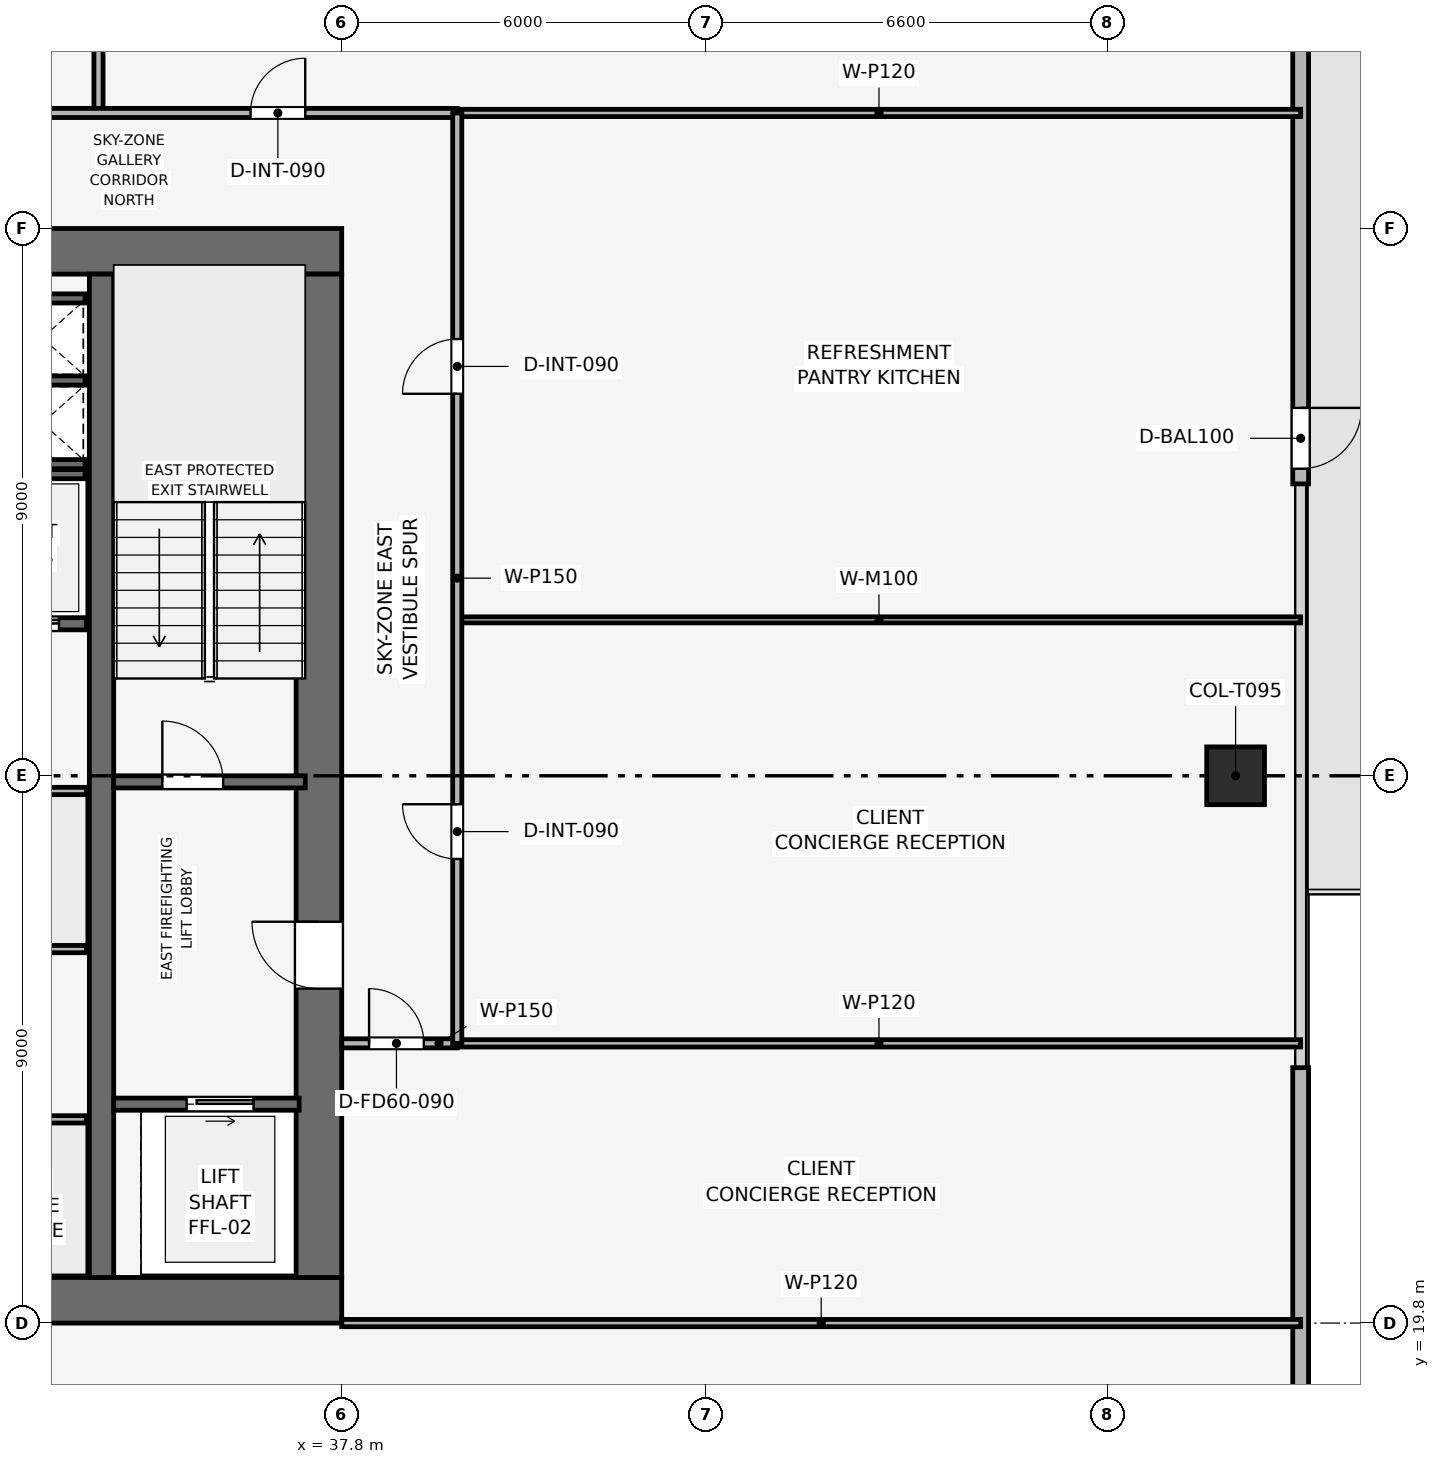
"""IFC4 building model, lengths in metres.
Left out: names, types, materials, properties, quantities, classifications, styles, units other than length and angle.
Written with IfcOpenShell. Run it as: python <this file> out.ifc"""

import sys

from ifc_helpers import new_model, si_unit, direction, frame, frame_2d, origin, origin_2d, place, context, subcontext, project, spatial, rectangle, extrude, element, fill, save


model = new_model("IFC4")
c1 = context("Model", 3, precision=1e-05, world=origin(), true_north=direction((0.0, 1.0)))
c2 = subcontext(c1, "Body", "Model", "MODEL_VIEW")
j1 = project(units=[si_unit("LENGTHUNIT", "METRE"), si_unit("PLANEANGLEUNIT", "RADIAN")], contexts=[c1])
p1 = place(None, origin())
s1 = spatial("IfcSite", under=j1, at=p1, CompositionType="ELEMENT")
p2 = place(p1, origin())
s2 = spatial("IfcBuilding", under=s1, at=p2, CompositionType="ELEMENT")
p3 = place(p2, frame((0.0, 0.0, 272.85)))
s3 = spatial("IfcBuildingStorey", under=s2, at=p3, CompositionType="ELEMENT", Elevation=272.85)
p4 = place(p3, frame((19.8, 20.175, 0.0), z_axis=(0.0, 0.0, 1.0), x_axis=(1.0, 0.0, 0.0)))
e1 = element("IfcWall", 1, at=p4, inside=s3, PredefinedType="SHEAR", context=c2, shape_type="SweptSolid", body=[
    extrude(rectangle(XDim=18.0, YDim=0.75, at=frame_2d((9.0, 0.0))), origin(), (0.0, 0.0, 1.0), 3.75),
])
p5 = place(p3, frame((19.8, 37.425, 0.0), z_axis=(0.0, 0.0, 1.0), x_axis=(1.0, 0.0, 0.0)))
e2 = element("IfcWall", 2, at=p5, inside=s3, PredefinedType="SHEAR", context=c2, shape_type="SweptSolid", body=[
    extrude(rectangle(XDim=18.0, YDim=0.75, at=frame_2d((9.0, 0.0))), origin(), (0.0, 0.0, 1.0), 3.75),
])
p6 = place(p5, frame((7.05, 0.0, 0.0)))
e3 = element("IfcOpeningElement", 3, at=p6, cuts=e2, PredefinedType="OPENING", context=c2, shape_type="SweptSolid", body=[
    extrude(rectangle(XDim=1.1, YDim=2.15, at=frame_2d((0.55, 1.075))), frame((0.0, 0.385, 0.0), z_axis=(0.0, -1.0, 0.0), x_axis=(1.0, 0.0, 0.0)), (0.0, 0.0, 1.0), 0.77),
])
p7 = place(p3, frame((37.425, 20.55, 0.0), z_axis=(0.0, 0.0, 1.0), x_axis=(0.0, 1.0, 0.0)))
e4 = element("IfcWall", 4, at=p7, inside=s3, PredefinedType="SHEAR", context=c2, shape_type="SweptSolid", body=[
    extrude(rectangle(XDim=16.5, YDim=0.75, at=frame_2d((8.25, 0.0))), origin(), (0.0, 0.0, 1.0), 3.75),
])
p8 = place(p7, frame((4.75, 0.0, 0.0)))
e5 = element("IfcOpeningElement", 5, at=p8, cuts=e4, PredefinedType="OPENING", context=c2, shape_type="SweptSolid", body=[
    extrude(rectangle(XDim=1.1, YDim=2.15, at=frame_2d((0.55, 1.075))), frame((0.0, 0.385, 0.0), z_axis=(0.0, -1.0, 0.0), x_axis=(1.0, 0.0, 0.0)), (0.0, 0.0, 1.0), 0.77),
])
p9 = place(p3, frame((33.85, 20.55, 0.0), z_axis=(0.0, 0.0, 1.0), x_axis=(0.0, 1.0, 0.0)))
e6 = element("IfcWall", 6, at=p9, inside=s3, PredefinedType="SHEAR", context=c2, shape_type="SweptSolid", body=[
    extrude(rectangle(XDim=16.5, YDim=0.4, at=frame_2d((8.25, 0.0))), origin(), (0.0, 0.0, 1.0), 3.75),
])
p10 = place(p3, frame((52.5, 28.8, 0.003), z_axis=(0.0, 0.0, 1.0), x_axis=(1.0, 0.0, 0.0)))
e7 = element("IfcColumn", 7, at=p10, inside=s3, PredefinedType="COLUMN", context=c2, shape_type="SweptSolid", body=[
    extrude(rectangle(XDim=0.95, YDim=0.95, at=origin_2d()), origin(), (0.0, 0.0, 1.0), 3.494),
])
p11 = place(p3, frame((53.57, 46.8, 0.0), z_axis=(0.0, 0.0, 1.0), x_axis=(0.0, -1.0, 0.0)))
e8 = element("IfcWall", 8, at=p11, inside=s3, PredefinedType="SOLIDWALL", context=c2, shape_type="SweptSolid", body=[
    extrude(rectangle(XDim=13.2, YDim=0.26, at=frame_2d((6.6, 0.0))), origin(), (0.0, 0.0, 1.0), 3.5),
])
p12 = place(p11, frame((11.95, 0.0, 0.0)))
e9 = element("IfcOpeningElement", 9, at=p12, cuts=e8, PredefinedType="OPENING", context=c2, shape_type="SweptSolid", body=[
    extrude(rectangle(XDim=1.0, YDim=2.2, at=frame_2d((0.5, 1.1))), frame((0.0, 0.14, 0.0), z_axis=(0.0, -1.0, 0.0), x_axis=(1.0, 0.0, 0.0)), (0.0, 0.0, 1.0), 0.28),
])
p13 = place(p3, frame((53.57, 24.0, 0.0), z_axis=(0.0, 0.0, 1.0), x_axis=(0.0, -1.0, 0.0)))
e10 = element("IfcWall", 10, at=p13, inside=s3, PredefinedType="SOLIDWALL", context=c2, shape_type="SweptSolid", body=[
    extrude(rectangle(XDim=13.2, YDim=0.26, at=frame_2d((6.6, 0.0))), origin(), (0.0, 0.0, 1.0), 3.5),
])
p14 = place(p13, frame((11.75, 0.0, 0.9)))
e11 = element("IfcOpeningElement", 11, at=p14, cuts=e10, PredefinedType="OPENING", context=c2, shape_type="SweptSolid", body=[
    extrude(rectangle(XDim=1.2, YDim=2.1, at=frame_2d((0.6, 1.05))), frame((0.0, 0.14, 0.0), z_axis=(0.0, -1.0, 0.0), x_axis=(1.0, 0.0, 0.0)), (0.0, 0.0, 1.0), 0.28),
])
p15 = place(p3, frame((34.05, 28.7, 0.0), z_axis=(0.0, 0.0, 1.0), x_axis=(1.0, 0.0, 0.0)))
e12 = element("IfcWall", 12, at=p15, inside=s3, PredefinedType="SHEAR", context=c2, shape_type="SweptSolid", body=[
    extrude(rectangle(XDim=3.15, YDim=0.2, at=frame_2d((1.575, 0.0))), origin(), (0.0, 0.0, 1.0), 3.5),
])
p16 = place(p15, frame((0.8, 0.0, 0.0)))
e13 = element("IfcOpeningElement", 13, at=p16, cuts=e12, PredefinedType="OPENING", context=c2, shape_type="SweptSolid", body=[
    extrude(rectangle(XDim=1.0, YDim=2.1, at=frame_2d((0.5, 1.05))), frame((0.0, 0.11, 0.0), z_axis=(0.0, -1.0, 0.0), x_axis=(1.0, 0.0, 0.0)), (0.0, 0.0, 1.0), 0.22),
])
for number, where, z_axis, x_axis in (
    (14, (32.25, 33.925, 0.0), (0.0, 0.0, 1.0), (1.0, 0.0, 0.0)),
    (15, (32.25, 35.3, 0.0), (0.0, 0.0, 1.0), (1.0, 0.0, 0.0)),
):
    element("IfcWall", number, at=place(p3, frame(where, z_axis=z_axis, x_axis=x_axis)), inside=s3, PredefinedType="SHEAR", context=c2, shape_type="SweptSolid", body=[
        extrude(rectangle(XDim=1.33, YDim=0.15, at=frame_2d((0.665, 0.0))), origin(), (0.0, 0.0, 1.0), 3.5),
    ])
p17 = place(p3, frame((34.05, 23.4, 0.0), z_axis=(0.0, 0.0, 1.0), x_axis=(1.0, 0.0, 0.0)))
e16 = element("IfcWall", 16, at=p17, inside=s3, PredefinedType="SHEAR", context=c2, shape_type="SweptSolid", body=[
    extrude(rectangle(XDim=3.05, YDim=0.2, at=frame_2d((1.525, 0.0))), origin(), (0.0, 0.0, 1.0), 3.5),
])
p18 = place(p17, frame((1.2, 0.0, 0.0)))
e17 = element("IfcOpeningElement", 17, at=p18, cuts=e16, PredefinedType="OPENING", context=c2, shape_type="SweptSolid", body=[
    extrude(rectangle(XDim=1.1, YDim=2.15, at=frame_2d((0.55, 1.075))), frame((0.0, 0.11, 0.0), z_axis=(0.0, -1.0, 0.0), x_axis=(1.0, 0.0, 0.0)), (0.0, 0.0, 1.0), 0.22),
])
p19 = place(p3, frame((31.6, 31.3, 0.0), z_axis=(0.0, 0.0, 1.0), x_axis=(1.0, 0.0, 0.0)))
e18 = element("IfcWall", 18, at=p19, inside=s3, PredefinedType="SHEAR", context=c2, shape_type="SweptSolid", body=[
    extrude(rectangle(XDim=2.0, YDim=0.2, at=frame_2d((1.0, 0.0))), origin(), (0.0, 0.0, 1.0), 3.5),
])
p20 = place(p19, frame((0.45, 0.0, 0.0)))
e19 = element("IfcOpeningElement", 19, at=p20, cuts=e18, PredefinedType="OPENING", context=c2, shape_type="SweptSolid", body=[
    extrude(rectangle(XDim=1.1, YDim=2.15, at=frame_2d((0.55, 1.075))), frame((0.0, 0.11, 0.0), z_axis=(0.0, -1.0, 0.0), x_axis=(1.0, 0.0, 0.0)), (0.0, 0.0, 1.0), 0.22),
])
p21 = place(p3, frame((32.25, 36.65, 0.0), z_axis=(0.0, 0.0, 1.0), x_axis=(1.0, 0.0, 0.0)))
e20 = element("IfcWall", 20, at=p21, inside=s3, PredefinedType="SHEAR", context=c2, shape_type="SweptSolid", body=[
    extrude(rectangle(XDim=1.33, YDim=0.15, at=frame_2d((0.665, 0.0))), origin(), (0.0, 0.0, 1.0), 3.5),
])
p22 = place(p3, frame((29.5, 33.76, 0.0), z_axis=(0.0, 0.0, 1.0), x_axis=(1.0, 0.0, 0.0)))
e21 = element("IfcWall", 21, at=p22, inside=s3, PredefinedType="SHEAR", context=c2, shape_type="SweptSolid", body=[
    extrude(rectangle(XDim=4.08, YDim=0.15, at=frame_2d((2.04, 0.0))), origin(), (0.0, 0.0, 1.0), 3.5),
])
p23 = place(p3, frame((29.55, 23.15, 0.0), z_axis=(0.0, 0.0, 1.0), x_axis=(1.0, 0.0, 0.0)))
e22 = element("IfcWall", 22, at=p23, inside=s3, PredefinedType="PARTITIONING", context=c2, shape_type="SweptSolid", body=[
    extrude(rectangle(XDim=4.05, YDim=0.12, at=frame_2d((2.025, 0.0))), origin(), (0.0, 0.0, 1.0), 3.5),
])
p24 = place(p23, frame((1.575, 0.0, 0.0)))
e23 = element("IfcOpeningElement", 23, at=p24, cuts=e22, PredefinedType="OPENING", context=c2, shape_type="SweptSolid", body=[
    extrude(rectangle(XDim=0.9, YDim=2.1, at=frame_2d((0.45, 1.05))), frame((0.0, 0.07, 0.0), z_axis=(0.0, -1.0, 0.0), x_axis=(1.0, 0.0, 0.0)), (0.0, 0.0, 1.0), 0.14),
])
p25 = place(p3, frame((29.55, 25.95, 0.0), z_axis=(0.0, 0.0, 1.0), x_axis=(1.0, 0.0, 0.0)))
e24 = element("IfcWall", 24, at=p25, inside=s3, PredefinedType="PARTITIONING", context=c2, shape_type="SweptSolid", body=[
    extrude(rectangle(XDim=4.05, YDim=0.12, at=frame_2d((2.025, 0.0))), origin(), (0.0, 0.0, 1.0), 3.5),
])
p26 = place(p25, frame((1.575, 0.0, 0.0)))
e25 = element("IfcOpeningElement", 25, at=p26, cuts=e24, PredefinedType="OPENING", context=c2, shape_type="SweptSolid", body=[
    extrude(rectangle(XDim=0.9, YDim=2.1, at=frame_2d((0.45, 1.05))), frame((0.0, 0.07, 0.0), z_axis=(0.0, -1.0, 0.0), x_axis=(1.0, 0.0, 0.0)), (0.0, 0.0, 1.0), 0.14),
])
p27 = place(p3, frame((29.55, 28.55, 0.0), z_axis=(0.0, 0.0, 1.0), x_axis=(1.0, 0.0, 0.0)))
e26 = element("IfcWall", 26, at=p27, inside=s3, PredefinedType="PARTITIONING", context=c2, shape_type="SweptSolid", body=[
    extrude(rectangle(XDim=4.05, YDim=0.12, at=frame_2d((2.025, 0.0))), origin(), (0.0, 0.0, 1.0), 3.5),
])
p28 = place(p3, frame((33.8, 39.7, 0.0), z_axis=(0.0, 0.0, 1.0), x_axis=(0.0, 1.0, 0.0)))
e27 = element("IfcWall", 27, at=p28, inside=s3, PredefinedType="PARTITIONING", context=c2, shape_type="SweptSolid", body=[
    extrude(rectangle(XDim=13.87, YDim=0.15, at=frame_2d((6.935, 0.0))), origin(), (0.0, 0.0, 1.0), 3.085),
])
p29 = place(p3, frame((37.8, 19.8, 0.0), z_axis=(0.0, 0.0, 1.0), x_axis=(1.0, 0.0, 0.0)))
e28 = element("IfcWall", 28, at=p29, inside=s3, PredefinedType="PARTITIONING", context=c2, shape_type="SweptSolid", body=[
    extrude(rectangle(XDim=15.77, YDim=0.12, at=frame_2d((7.885, 0.0))), origin(), (0.0, 0.0, 1.0), 3.085),
])
p30 = place(p3, frame((37.8, 24.4, 0.0), z_axis=(0.0, 0.0, 1.0), x_axis=(1.0, 0.0, 0.0)))
e29 = element("IfcWall", 29, at=p30, inside=s3, PredefinedType="PARTITIONING", context=c2, shape_type="SweptSolid", body=[
    extrude(rectangle(XDim=1.9, YDim=0.15, at=frame_2d((0.95, 0.0))), origin(), (0.0, 0.0, 1.0), 3.5),
])
p31 = place(p30, frame((0.45, 0.0, 0.0)))
e30 = element("IfcOpeningElement", 30, at=p31, cuts=e29, PredefinedType="OPENING", context=c2, shape_type="SweptSolid", body=[
    extrude(rectangle(XDim=0.9, YDim=2.1, at=frame_2d((0.45, 1.05))), frame((0.0, 0.085, 0.0), z_axis=(0.0, -1.0, 0.0), x_axis=(1.0, 0.0, 0.0)), (0.0, 0.0, 1.0), 0.17),
])
p32 = place(p3, frame((39.7, 24.4, 0.0), z_axis=(0.0, 0.0, 1.0), x_axis=(1.0, 0.0, 0.0)))
e31 = element("IfcWall", 31, at=p32, inside=s3, PredefinedType="PARTITIONING", context=c2, shape_type="SweptSolid", body=[
    extrude(rectangle(XDim=13.87, YDim=0.12, at=frame_2d((6.935, 0.0))), origin(), (0.0, 0.0, 1.0), 3.085),
])
p33 = place(p3, frame((39.7, 31.364, 0.0), z_axis=(0.0, 0.0, 1.0), x_axis=(1.0, 0.0, 0.0)))
e32 = element("IfcWall", 32, at=p33, inside=s3, PredefinedType="MOVABLE", context=c2, shape_type="SweptSolid", body=[
    extrude(rectangle(XDim=13.87, YDim=0.1, at=frame_2d((6.935, 0.0))), origin(), (0.0, 0.0, 1.0), 3.085),
])
p34 = place(p3, frame((39.7, 39.7, 0.0), z_axis=(0.0, 0.0, 1.0), x_axis=(1.0, 0.0, 0.0)))
e33 = element("IfcWall", 33, at=p34, inside=s3, PredefinedType="PARTITIONING", context=c2, shape_type="SweptSolid", body=[
    extrude(rectangle(XDim=13.87, YDim=0.12, at=frame_2d((6.935, 0.0))), origin(), (0.0, 0.0, 1.0), 3.085),
])
p35 = place(p3, frame((17.9, 39.7, 0.0), z_axis=(0.0, 0.0, 1.0), x_axis=(1.0, 0.0, 0.0)))
e34 = element("IfcWall", 34, at=p35, inside=s3, PredefinedType="PARTITIONING", context=c2, shape_type="SweptSolid", body=[
    extrude(rectangle(XDim=21.8, YDim=0.15, at=frame_2d((10.9, 0.0))), origin(), (0.0, 0.0, 1.0), 3.085),
])
p36 = place(p35, frame((3.3, 0.0, 0.0)))
e35 = element("IfcOpeningElement", 35, at=p36, cuts=e34, PredefinedType="OPENING", context=c2, shape_type="SweptSolid", body=[
    extrude(rectangle(XDim=0.9, YDim=2.1, at=frame_2d((0.45, 1.05))), frame((0.0, 0.085, 0.0), z_axis=(0.0, -1.0, 0.0), x_axis=(1.0, 0.0, 0.0)), (0.0, 0.0, 1.0), 0.17),
])
p37 = place(p35, frame((8.45, 0.0, 0.0)))
e36 = element("IfcOpeningElement", 36, at=p37, cuts=e34, PredefinedType="OPENING", context=c2, shape_type="SweptSolid", body=[
    extrude(rectangle(XDim=0.9, YDim=2.1, at=frame_2d((0.45, 1.05))), frame((0.0, 0.085, 0.0), z_axis=(0.0, -1.0, 0.0), x_axis=(1.0, 0.0, 0.0)), (0.0, 0.0, 1.0), 0.17),
])
p38 = place(p35, frame((11.35, 0.0, 0.0)))
e37 = element("IfcOpeningElement", 37, at=p38, cuts=e34, PredefinedType="OPENING", context=c2, shape_type="SweptSolid", body=[
    extrude(rectangle(XDim=0.9, YDim=2.1, at=frame_2d((0.45, 1.05))), frame((0.0, 0.085, 0.0), z_axis=(0.0, -1.0, 0.0), x_axis=(1.0, 0.0, 0.0)), (0.0, 0.0, 1.0), 0.17),
])
p39 = place(p35, frame((14.1, 0.0, 0.0)))
e38 = element("IfcOpeningElement", 38, at=p39, cuts=e34, PredefinedType="OPENING", context=c2, shape_type="SweptSolid", body=[
    extrude(rectangle(XDim=0.95, YDim=2.1, at=frame_2d((0.475, 1.05))), frame((0.0, 0.085, 0.0), z_axis=(0.0, -1.0, 0.0), x_axis=(1.0, 0.0, 0.0)), (0.0, 0.0, 1.0), 0.17),
])
p40 = place(p35, frame((18.4, 0.0, 0.0)))
e39 = element("IfcOpeningElement", 39, at=p40, cuts=e34, PredefinedType="OPENING", context=c2, shape_type="SweptSolid", body=[
    extrude(rectangle(XDim=0.9, YDim=2.1, at=frame_2d((0.45, 1.05))), frame((0.0, 0.085, 0.0), z_axis=(0.0, -1.0, 0.0), x_axis=(1.0, 0.0, 0.0)), (0.0, 0.0, 1.0), 0.17),
])
p41 = place(p3, frame((39.7, 24.4, 0.0), z_axis=(0.0, 0.0, 1.0), x_axis=(0.0, 1.0, 0.0)))
e40 = element("IfcWall", 40, at=p41, inside=s3, PredefinedType="PARTITIONING", context=c2, shape_type="SweptSolid", body=[
    extrude(rectangle(XDim=15.3, YDim=0.15, at=frame_2d((7.65, 0.0))), origin(), (0.0, 0.0, 1.0), 3.085),
])
p42 = place(p41, frame((3.032, 0.0, 0.0)))
e41 = element("IfcOpeningElement", 41, at=p42, cuts=e40, PredefinedType="OPENING", context=c2, shape_type="SweptSolid", body=[
    extrude(rectangle(XDim=0.9, YDim=2.1, at=frame_2d((0.45, 1.05))), frame((0.0, 0.085, 0.0), z_axis=(0.0, -1.0, 0.0), x_axis=(1.0, 0.0, 0.0)), (0.0, 0.0, 1.0), 0.17),
])
p43 = place(p41, frame((10.682, 0.0, 0.0)))
e42 = element("IfcOpeningElement", 42, at=p43, cuts=e40, PredefinedType="OPENING", context=c2, shape_type="SweptSolid", body=[
    extrude(rectangle(XDim=0.9, YDim=2.1, at=frame_2d((0.45, 1.05))), frame((0.0, 0.085, 0.0), z_axis=(0.0, -1.0, 0.0), x_axis=(1.0, 0.0, 0.0)), (0.0, 0.0, 1.0), 0.17),
])
p44 = place(p12, origin())
e43 = element("IfcDoor", 43, at=p44, inside=s3, OperationType="SINGLE_SWING_LEFT", PredefinedType="DOOR", context=c2, shape_type="SweptSolid", body=[
    extrude(rectangle(XDim=1.0, YDim=2.2, at=frame_2d((0.5, 1.1))), frame((0.0, 0.025, 0.0), z_axis=(0.0, -1.0, 0.0), x_axis=(1.0, 0.0, 0.0)), (0.0, 0.0, 1.0), 0.05),
])
fill(e9, e43)
p45 = place(p16, origin())
e44 = element("IfcDoor", 44, at=p45, inside=s3, OperationType="SINGLE_SWING_LEFT", PredefinedType="DOOR", context=c2, shape_type="SweptSolid", body=[
    extrude(rectangle(XDim=1.0, YDim=2.1, at=frame_2d((0.5, 1.05))), frame((0.0, 0.025, 0.0), z_axis=(0.0, -1.0, 0.0), x_axis=(1.0, 0.0, 0.0)), (0.0, 0.0, 1.0), 0.05),
])
fill(e13, e44)
p46 = place(p18, origin())
e45 = element("IfcDoor", 45, at=p46, inside=s3, OperationType="SLIDING_TO_RIGHT", PredefinedType="DOOR", context=c2, shape_type="SweptSolid", body=[
    extrude(rectangle(XDim=1.1, YDim=2.15, at=frame_2d((0.55, 1.075))), frame((0.0, 0.025, 0.0), z_axis=(0.0, -1.0, 0.0), x_axis=(1.0, 0.0, 0.0)), (0.0, 0.0, 1.0), 0.05),
])
fill(e17, e45)
p47 = place(p20, origin())
e46 = element("IfcDoor", 46, at=p47, inside=s3, OperationType="SLIDING_TO_RIGHT", PredefinedType="DOOR", context=c2, shape_type="SweptSolid", body=[
    extrude(rectangle(XDim=1.1, YDim=2.15, at=frame_2d((0.55, 1.075))), frame((0.0, 0.025, 0.0), z_axis=(0.0, -1.0, 0.0), x_axis=(1.0, 0.0, 0.0)), (0.0, 0.0, 1.0), 0.05),
])
fill(e19, e46)
p48 = place(p31, origin())
e47 = element("IfcDoor", 47, at=p48, inside=s3, OperationType="SINGLE_SWING_LEFT", PredefinedType="DOOR", context=c2, shape_type="SweptSolid", body=[
    extrude(rectangle(XDim=0.9, YDim=2.1, at=frame_2d((0.45, 1.05))), frame((0.0, 0.025, 0.0), z_axis=(0.0, -1.0, 0.0), x_axis=(1.0, 0.0, 0.0)), (0.0, 0.0, 1.0), 0.05),
])
fill(e30, e47)
p49 = place(p40, origin())
e48 = element("IfcDoor", 48, at=p49, inside=s3, OperationType="SINGLE_SWING_RIGHT", PredefinedType="DOOR", context=c2, shape_type="SweptSolid", body=[
    extrude(rectangle(XDim=0.9, YDim=2.1, at=frame_2d((0.45, 1.05))), frame((0.0, 0.025, 0.0), z_axis=(0.0, -1.0, 0.0), x_axis=(1.0, 0.0, 0.0)), (0.0, 0.0, 1.0), 0.05),
])
fill(e39, e48)
p50 = place(p42, origin())
e49 = element("IfcDoor", 49, at=p50, inside=s3, OperationType="SINGLE_SWING_RIGHT", PredefinedType="DOOR", context=c2, shape_type="SweptSolid", body=[
    extrude(rectangle(XDim=0.9, YDim=2.1, at=frame_2d((0.45, 1.05))), frame((0.0, 0.025, 0.0), z_axis=(0.0, -1.0, 0.0), x_axis=(1.0, 0.0, 0.0)), (0.0, 0.0, 1.0), 0.05),
])
fill(e41, e49)
p51 = place(p43, origin())
e50 = element("IfcDoor", 50, at=p51, inside=s3, OperationType="SINGLE_SWING_LEFT", PredefinedType="DOOR", context=c2, shape_type="SweptSolid", body=[
    extrude(rectangle(XDim=0.9, YDim=2.1, at=frame_2d((0.45, 1.05))), frame((0.0, 0.025, 0.0), z_axis=(0.0, -1.0, 0.0), x_axis=(1.0, 0.0, 0.0)), (0.0, 0.0, 1.0), 0.05),
])
fill(e42, e50)
p52 = place(p8, origin())
e51 = element("IfcDoor", 51, at=p52, inside=s3, OperationType="SINGLE_SWING_RIGHT", PredefinedType="DOOR", context=c2, shape_type="SweptSolid", body=[
    extrude(rectangle(XDim=1.1, YDim=2.15, at=frame_2d((0.55, 1.075))), frame((0.0, 0.025, 0.0), z_axis=(0.0, -1.0, 0.0), x_axis=(1.0, 0.0, 0.0)), (0.0, 0.0, 1.0), 0.05),
])
fill(e5, e51)
save(model, sys.argv[1])
